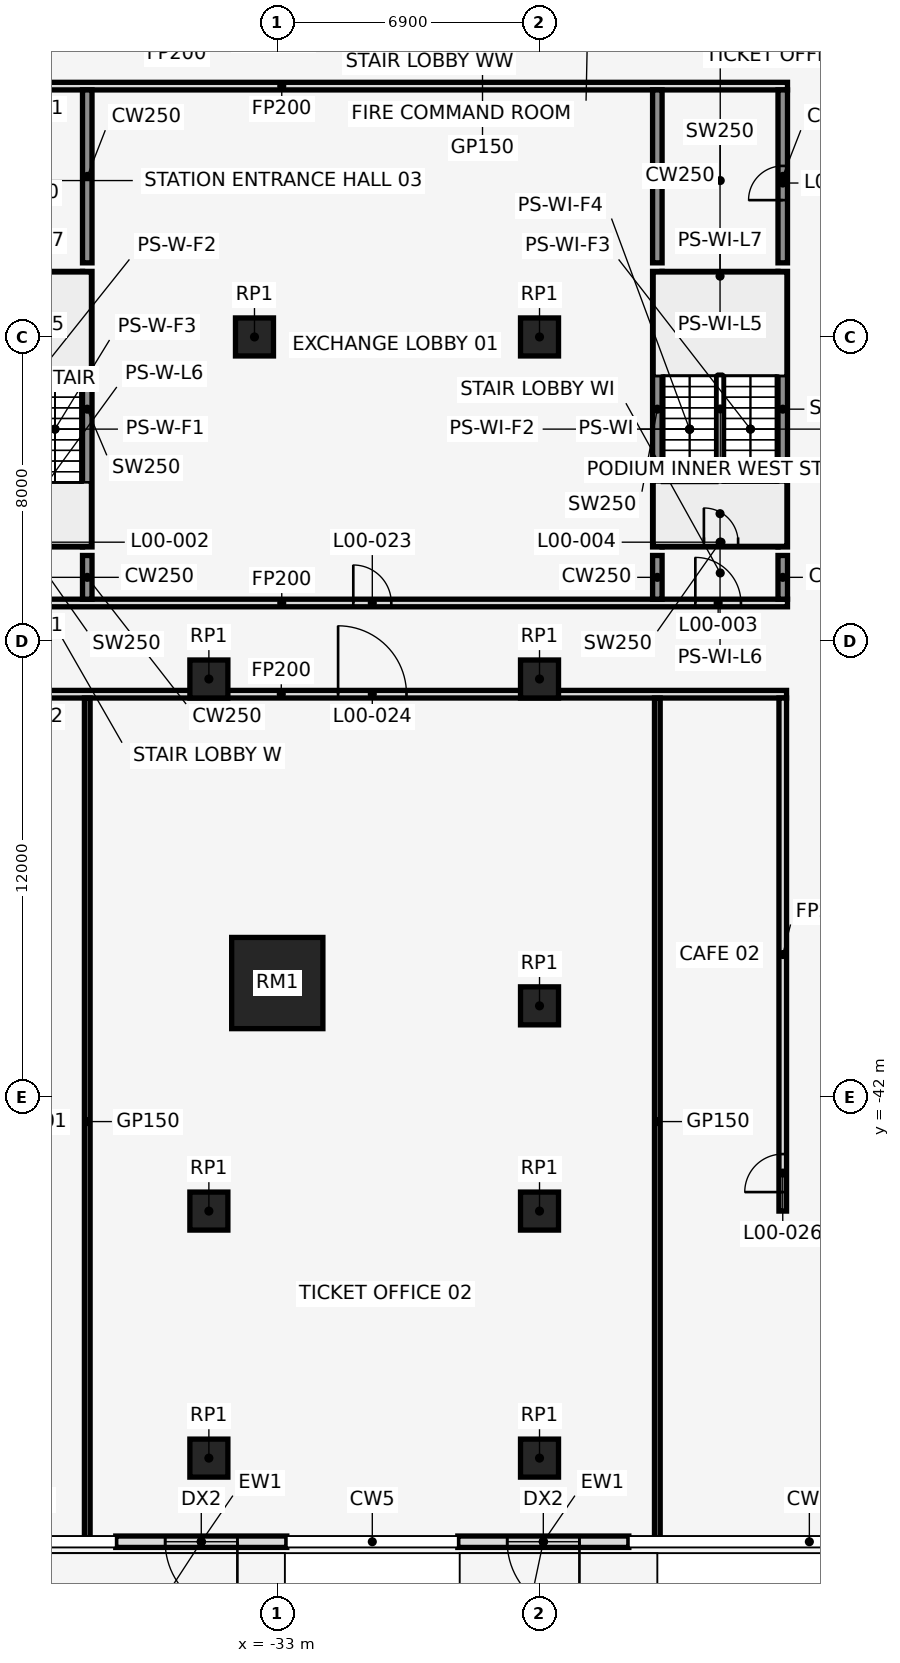
"""IFC4 building model, lengths in metres.
Left out: names, types, materials, properties, quantities, classifications, styles, units other than length and angle.
Written with IfcOpenShell. Run it as: python <this file> out.ifc"""

import sys

from ifc_helpers import new_model, si_unit, direction, frame, frame_2d, origin, origin_2d, place, context, subcontext, project, spatial, rectangle, extrude, element, fill, save


model = new_model("IFC4")
c1 = context("Model", 3, precision=1e-05, world=origin(), true_north=direction((0.0, 1.0)))
c2 = subcontext(c1, "Body", "Model", "MODEL_VIEW")
j1 = project(units=[si_unit("LENGTHUNIT", "METRE"), si_unit("PLANEANGLEUNIT", "RADIAN")], contexts=[c1])
p1 = place(None, origin())
s1 = spatial("IfcSite", under=j1, at=p1, CompositionType="ELEMENT")
p2 = place(p1, origin())
s2 = spatial("IfcBuilding", under=s1, at=p2, CompositionType="ELEMENT")
p3 = place(p2, origin())
s3 = spatial("IfcBuildingStorey", under=s2, at=p3, CompositionType="ELEMENT", Elevation=0.0)
p4 = place(p3, frame((-33.0, -39.0, 0.0), z_axis=(0.0, 0.0, 1.0), x_axis=(1.0, 0.0, 0.0)))
e1 = element("IfcColumn", 1, at=p4, inside=s3, PredefinedType="COLUMN", context=c2, shape_type="SweptSolid", body=[
    extrude(rectangle(XDim=2.4, YDim=2.4, at=origin_2d()), origin(), (0.0, 0.0, 1.0), 8.0),
])
for number, where, z_axis, x_axis in (
    (2, (-26.1, -39.6, 0.0), (0.0, 0.0, 1.0), (1.0, 0.0, 0.0)),
    (3, (-33.6, -22.0, 0.0), (0.0, 0.0, 1.0), (1.0, 0.0, 0.0)),
    (4, (-26.1, -22.0, 0.0), (0.0, 0.0, 1.0), (1.0, 0.0, 0.0)),
    (5, (-34.8, -31.0, 0.0), (0.0, 0.0, 1.0), (1.0, 0.0, 0.0)),
    (6, (-34.8, -45.0, 0.0), (0.0, 0.0, 1.0), (1.0, 0.0, 0.0)),
    (7, (-34.8, -51.5, 0.0), (0.0, 0.0, 1.0), (1.0, 0.0, 0.0)),
    (8, (-26.1, -31.0, 0.0), (0.0, 0.0, 1.0), (1.0, 0.0, 0.0)),
    (9, (-26.1, -45.0, 0.0), (0.0, 0.0, 1.0), (1.0, 0.0, 0.0)),
    (10, (-26.1, -51.5, 0.0), (0.0, 0.0, 1.0), (1.0, 0.0, 0.0)),
):
    element("IfcColumn", number, at=place(p3, frame(where, z_axis=z_axis, x_axis=x_axis)), inside=s3, PredefinedType="COLUMN", context=c2, shape_type="SweptSolid", body=[
        extrude(rectangle(XDim=1.0, YDim=1.0, at=origin_2d()), origin(), (0.0, 0.0, 1.0), 8.0),
    ])
p5 = place(p3, frame((-32.75, -53.7, 0.0), z_axis=(0.0, 0.0, 1.0), x_axis=(-1.0, 0.0, 0.0)))
e11 = element("IfcWall", 11, at=p5, inside=s3, PredefinedType="STANDARD", context=c2, shape_type="SweptSolid", body=[
    extrude(rectangle(XDim=4.5, YDim=0.3, at=frame_2d((2.25, 0.0))), origin(), (0.0, 0.0, 1.0), 7.7),
])
p6 = place(p5, frame((1.3, 0.0, 0.0)))
e12 = element("IfcOpeningElement", 12, at=p6, cuts=e11, PredefinedType="OPENING", context=c2, shape_type="SweptSolid", body=[
    extrude(rectangle(XDim=1.9, YDim=2.6, at=frame_2d((0.95, 1.3))), frame((0.0, 0.162, 0.0), z_axis=(0.0, -1.0, 0.0), x_axis=(1.0, 0.0, 0.0)), (0.0, 0.0, 1.0), 0.324),
])
p7 = place(p5, frame((1.3, 0.0, 3.3)))
e13 = element("IfcOpeningElement", 13, at=p7, cuts=e11, PredefinedType="OPENING", context=c2, shape_type="SweptSolid", body=[
    extrude(rectangle(XDim=1.9, YDim=3.0, at=frame_2d((0.95, 1.5))), frame((0.0, 0.162, 0.0), z_axis=(0.0, -1.0, 0.0), x_axis=(1.0, 0.0, 0.0)), (0.0, 0.0, 1.0), 0.324),
])
p8 = place(p3, frame((-23.75, -53.7, 0.0), z_axis=(0.0, 0.0, 1.0), x_axis=(-1.0, 0.0, 0.0)))
e14 = element("IfcWall", 14, at=p8, inside=s3, PredefinedType="STANDARD", context=c2, shape_type="SweptSolid", body=[
    extrude(rectangle(XDim=4.5, YDim=0.3, at=frame_2d((2.25, 0.0))), origin(), (0.0, 0.0, 1.0), 7.7),
])
p9 = place(p8, frame((1.3, 0.0, 0.0)))
e15 = element("IfcOpeningElement", 15, at=p9, cuts=e14, PredefinedType="OPENING", context=c2, shape_type="SweptSolid", body=[
    extrude(rectangle(XDim=1.9, YDim=2.6, at=frame_2d((0.95, 1.3))), frame((0.0, 0.162, 0.0), z_axis=(0.0, -1.0, 0.0), x_axis=(1.0, 0.0, 0.0)), (0.0, 0.0, 1.0), 0.324),
])
p10 = place(p8, frame((1.3, 0.0, 3.3)))
e16 = element("IfcOpeningElement", 16, at=p10, cuts=e14, PredefinedType="OPENING", context=c2, shape_type="SweptSolid", body=[
    extrude(rectangle(XDim=1.9, YDim=3.0, at=frame_2d((0.95, 1.5))), frame((0.0, 0.162, 0.0), z_axis=(0.0, -1.0, 0.0), x_axis=(1.0, 0.0, 0.0)), (0.0, 0.0, 1.0), 0.324),
])
p11 = place(p3, frame((-38.0, -27.525, 0.0), z_axis=(0.0, 0.0, 1.0), x_axis=(0.0, 1.0, 0.0)))
e17 = element("IfcWall", 17, at=p11, inside=s3, PredefinedType="SHEAR", context=c2, shape_type="SweptSolid", body=[
    extrude(rectangle(XDim=7.25, YDim=0.25, at=frame_2d((3.625, 0.0))), origin(), (0.0, 0.0, 1.0), 8.0),
])
p12 = place(p3, frame((-41.175, -27.4, 0.0), z_axis=(0.0, 0.0, 1.0), x_axis=(1.0, 0.0, 0.0)))
e18 = element("IfcWall", 18, at=p12, inside=s3, PredefinedType="SHEAR", context=c2, shape_type="SweptSolid", body=[
    extrude(rectangle(XDim=3.05, YDim=0.25, at=frame_2d((1.525, 0.0))), origin(), (0.0, 0.0, 1.0), 8.0),
])
p13 = place(p12, frame((1.1, 0.0, 0.0)))
e19 = element("IfcOpeningElement", 19, at=p13, cuts=e18, PredefinedType="OPENING", context=c2, shape_type="SweptSolid", body=[
    extrude(rectangle(XDim=0.9, YDim=2.1, at=frame_2d((0.45, 1.05))), frame((0.0, 0.137, 0.0), z_axis=(0.0, -1.0, 0.0), x_axis=(1.0, 0.0, 0.0)), (0.0, 0.0, 1.0), 0.274),
])
p14 = place(p3, frame((-41.175, -20.4, 0.0), z_axis=(0.0, 0.0, 1.0), x_axis=(1.0, 0.0, 0.0)))
e20 = element("IfcWall", 20, at=p14, inside=s3, PredefinedType="SHEAR", context=c2, shape_type="SweptSolid", body=[
    extrude(rectangle(XDim=3.05, YDim=0.25, at=frame_2d((1.525, 0.0))), origin(), (0.0, 0.0, 1.0), 8.0),
])
for number, where, z_axis, x_axis in (
    (21, (-23.0, -27.525, 0.0), (0.0, 0.0, 1.0), (0.0, 1.0, 0.0)),
    (22, (-19.7, -27.525, 0.0), (0.0, 0.0, 1.0), (0.0, 1.0, 0.0)),
):
    element("IfcWall", number, at=place(p3, frame(where, z_axis=z_axis, x_axis=x_axis)), inside=s3, PredefinedType="SHEAR", context=c2, shape_type="SweptSolid", body=[
        extrude(rectangle(XDim=7.25, YDim=0.25, at=frame_2d((3.625, 0.0))), origin(), (0.0, 0.0, 1.0), 8.0),
    ])
p15 = place(p3, frame((-22.875, -27.4, 0.0), z_axis=(0.0, 0.0, 1.0), x_axis=(1.0, 0.0, 0.0)))
e23 = element("IfcWall", 23, at=p15, inside=s3, PredefinedType="SHEAR", context=c2, shape_type="SweptSolid", body=[
    extrude(rectangle(XDim=3.05, YDim=0.25, at=frame_2d((1.525, 0.0))), origin(), (0.0, 0.0, 1.0), 8.0),
])
p16 = place(p15, frame((1.1, 0.0, 0.0)))
e24 = element("IfcOpeningElement", 24, at=p16, cuts=e23, PredefinedType="OPENING", context=c2, shape_type="SweptSolid", body=[
    extrude(rectangle(XDim=0.9, YDim=2.1, at=frame_2d((0.45, 1.05))), frame((0.0, 0.137, 0.0), z_axis=(0.0, -1.0, 0.0), x_axis=(1.0, 0.0, 0.0)), (0.0, 0.0, 1.0), 0.274),
])
p17 = place(p3, frame((-22.875, -20.4, 0.0), z_axis=(0.0, 0.0, 1.0), x_axis=(1.0, 0.0, 0.0)))
e25 = element("IfcWall", 25, at=p17, inside=s3, PredefinedType="SHEAR", context=c2, shape_type="SweptSolid", body=[
    extrude(rectangle(XDim=3.05, YDim=0.25, at=frame_2d((1.525, 0.0))), origin(), (0.0, 0.0, 1.0), 8.0),
])
p18 = place(p3, frame((-46.19, -31.4, 0.0), z_axis=(0.0, 0.0, 1.0), x_axis=(1.0, 0.0, 0.0)))
e26 = element("IfcWall", 26, at=p18, inside=s3, PredefinedType="PARTITIONING", context=c2, shape_type="SweptSolid", body=[
    extrude(rectangle(XDim=26.59, YDim=0.2, at=frame_2d((13.295, 0.0))), origin(), (0.0, 0.0, 1.0), 7.7),
])
p19 = place(p18, frame((0.4, 0.0, 0.0)))
e27 = element("IfcOpeningElement", 27, at=p19, cuts=e26, PredefinedType="OPENING", context=c2, shape_type="SweptSolid", body=[
    extrude(rectangle(XDim=1.0, YDim=2.1, at=frame_2d((0.5, 1.05))), frame((0.0, 0.112, 0.0), z_axis=(0.0, -1.0, 0.0), x_axis=(1.0, 0.0, 0.0)), (0.0, 0.0, 1.0), 0.224),
])
p20 = place(p18, frame((5.99, 0.0, 0.0)))
e28 = element("IfcOpeningElement", 28, at=p20, cuts=e26, PredefinedType="OPENING", context=c2, shape_type="SweptSolid", body=[
    extrude(rectangle(XDim=1.0, YDim=2.1, at=frame_2d((0.5, 1.05))), frame((0.0, 0.112, 0.0), z_axis=(0.0, -1.0, 0.0), x_axis=(1.0, 0.0, 0.0)), (0.0, 0.0, 1.0), 0.224),
])
p21 = place(p18, frame((14.79, 0.0, 0.0)))
e29 = element("IfcOpeningElement", 29, at=p21, cuts=e26, PredefinedType="OPENING", context=c2, shape_type="SweptSolid", body=[
    extrude(rectangle(XDim=1.8, YDim=2.1, at=frame_2d((0.9, 1.05))), frame((0.0, 0.112, 0.0), z_axis=(0.0, -1.0, 0.0), x_axis=(1.0, 0.0, 0.0)), (0.0, 0.0, 1.0), 0.224),
])
p22 = place(p3, frame((-46.19, -29.0, 0.0), z_axis=(0.0, 0.0, 1.0), x_axis=(1.0, 0.0, 0.0)))
e30 = element("IfcWall", 30, at=p22, inside=s3, PredefinedType="PARTITIONING", context=c2, shape_type="SweptSolid", body=[
    extrude(rectangle(XDim=26.615, YDim=0.2, at=frame_2d((13.308, 0.0))), origin(), (0.0, 0.0, 1.0), 7.7),
])
p23 = place(p22, frame((5.89, 0.0, 0.0)))
e31 = element("IfcOpeningElement", 31, at=p23, cuts=e30, PredefinedType="OPENING", context=c2, shape_type="SweptSolid", body=[
    extrude(rectangle(XDim=1.2, YDim=2.1, at=frame_2d((0.6, 1.05))), frame((0.0, 0.112, 0.0), z_axis=(0.0, -1.0, 0.0), x_axis=(1.0, 0.0, 0.0)), (0.0, 0.0, 1.0), 0.224),
])
p24 = place(p22, frame((24.19, 0.0, 0.0)))
e32 = element("IfcOpeningElement", 32, at=p24, cuts=e30, PredefinedType="OPENING", context=c2, shape_type="SweptSolid", body=[
    extrude(rectangle(XDim=1.2, YDim=2.1, at=frame_2d((0.6, 1.05))), frame((0.0, 0.112, 0.0), z_axis=(0.0, -1.0, 0.0), x_axis=(1.0, 0.0, 0.0)), (0.0, 0.0, 1.0), 0.224),
])
p25 = place(p22, frame((1.9, 0.0, 0.0)))
e33 = element("IfcOpeningElement", 33, at=p25, cuts=e30, PredefinedType="OPENING", context=c2, shape_type="SweptSolid", body=[
    extrude(rectangle(XDim=1.0, YDim=2.1, at=frame_2d((0.5, 1.05))), frame((0.0, 0.112, 0.0), z_axis=(0.0, -1.0, 0.0), x_axis=(1.0, 0.0, 0.0)), (0.0, 0.0, 1.0), 0.224),
])
p26 = place(p22, frame((15.19, 0.0, 0.0)))
e34 = element("IfcOpeningElement", 34, at=p26, cuts=e30, PredefinedType="OPENING", context=c2, shape_type="SweptSolid", body=[
    extrude(rectangle(XDim=1.0, YDim=2.1, at=frame_2d((0.5, 1.05))), frame((0.0, 0.112, 0.0), z_axis=(0.0, -1.0, 0.0), x_axis=(1.0, 0.0, 0.0)), (0.0, 0.0, 1.0), 0.224),
])
p27 = place(p3, frame((-46.19, -15.4, 0.0), z_axis=(0.0, 0.0, 1.0), x_axis=(1.0, 0.0, 0.0)))
e35 = element("IfcWall", 35, at=p27, inside=s3, PredefinedType="PARTITIONING", context=c2, shape_type="SweptSolid", body=[
    extrude(rectangle(XDim=26.615, YDim=0.2, at=frame_2d((13.308, 0.0))), origin(), (0.0, 0.0, 1.0), 7.7),
])
p28 = place(p27, frame((6.09, 0.0, 0.0)))
e36 = element("IfcOpeningElement", 36, at=p28, cuts=e35, PredefinedType="OPENING", context=c2, shape_type="SweptSolid", body=[
    extrude(rectangle(XDim=0.9, YDim=2.1, at=frame_2d((0.45, 1.05))), frame((0.0, 0.112, 0.0), z_axis=(0.0, -1.0, 0.0), x_axis=(1.0, 0.0, 0.0)), (0.0, 0.0, 1.0), 0.224),
])
p29 = place(p3, frame((-38.0, -53.79, 0.0), z_axis=(0.0, 0.0, 1.0), x_axis=(0.0, 1.0, 0.0)))
e37 = element("IfcWall", 37, at=p29, inside=s3, PredefinedType="PARTITIONING", context=c2, shape_type="SweptSolid", body=[
    extrude(rectangle(XDim=22.29, YDim=0.15, at=frame_2d((11.145, 0.0))), origin(), (0.0, 0.0, 1.0), 7.7),
])
p30 = place(p3, frame((-38.0, -28.9, 0.0), z_axis=(0.0, 0.0, 1.0), x_axis=(0.0, 1.0, 0.0)))
e38 = element("IfcWall", 38, at=p30, inside=s3, PredefinedType="SHEAR", context=c2, shape_type="SweptSolid", body=[
    extrude(rectangle(XDim=1.15, YDim=0.25, at=frame_2d((0.575, 0.0))), origin(), (0.0, 0.0, 1.0), 8.0),
])
p31 = place(p3, frame((-38.0, -20.05, 0.0), z_axis=(0.0, 0.0, 1.0), x_axis=(0.0, 1.0, 0.0)))
e39 = element("IfcWall", 39, at=p31, inside=s3, PredefinedType="SHEAR", context=c2, shape_type="SweptSolid", body=[
    extrude(rectangle(XDim=4.55, YDim=0.25, at=frame_2d((2.275, 0.0))), origin(), (0.0, 0.0, 1.0), 8.0),
])
p32 = place(p3, frame((-23.0, -53.79, 0.0), z_axis=(0.0, 0.0, 1.0), x_axis=(0.0, 1.0, 0.0)))
e40 = element("IfcWall", 40, at=p32, inside=s3, PredefinedType="PARTITIONING", context=c2, shape_type="SweptSolid", body=[
    extrude(rectangle(XDim=22.29, YDim=0.15, at=frame_2d((11.145, 0.0))), origin(), (0.0, 0.0, 1.0), 7.7),
])
p33 = place(p3, frame((-23.0, -28.9, 0.0), z_axis=(0.0, 0.0, 1.0), x_axis=(0.0, 1.0, 0.0)))
e41 = element("IfcWall", 41, at=p33, inside=s3, PredefinedType="SHEAR", context=c2, shape_type="SweptSolid", body=[
    extrude(rectangle(XDim=1.15, YDim=0.25, at=frame_2d((0.575, 0.0))), origin(), (0.0, 0.0, 1.0), 8.0),
])
p34 = place(p3, frame((-23.0, -20.05, 0.0), z_axis=(0.0, 0.0, 1.0), x_axis=(0.0, 1.0, 0.0)))
e42 = element("IfcWall", 42, at=p34, inside=s3, PredefinedType="SHEAR", context=c2, shape_type="SweptSolid", body=[
    extrude(rectangle(XDim=4.55, YDim=0.25, at=frame_2d((2.275, 0.0))), origin(), (0.0, 0.0, 1.0), 8.0),
])
p35 = place(p3, frame((-19.7, -45.0, 0.0), z_axis=(0.0, 0.0, 1.0), x_axis=(0.0, 1.0, 0.0)))
e43 = element("IfcWall", 43, at=p35, inside=s3, PredefinedType="PARTITIONING", context=c2, shape_type="SweptSolid", body=[
    extrude(rectangle(XDim=13.5, YDim=0.2, at=frame_2d((6.75, 0.0))), origin(), (0.0, 0.0, 1.0), 7.7),
])
p36 = place(p35, frame((0.5, 0.0, 0.0)))
e44 = element("IfcOpeningElement", 44, at=p36, cuts=e43, PredefinedType="OPENING", context=c2, shape_type="SweptSolid", body=[
    extrude(rectangle(XDim=1.0, YDim=2.1, at=frame_2d((0.5, 1.05))), frame((0.0, 0.112, 0.0), z_axis=(0.0, -1.0, 0.0), x_axis=(1.0, 0.0, 0.0)), (0.0, 0.0, 1.0), 0.224),
])
p37 = place(p3, frame((-19.7, -28.9, 0.0), z_axis=(0.0, 0.0, 1.0), x_axis=(0.0, 1.0, 0.0)))
e45 = element("IfcWall", 45, at=p37, inside=s3, PredefinedType="SHEAR", context=c2, shape_type="SweptSolid", body=[
    extrude(rectangle(XDim=1.15, YDim=0.25, at=frame_2d((0.575, 0.0))), origin(), (0.0, 0.0, 1.0), 8.0),
])
p38 = place(p3, frame((-19.7, -20.05, 0.0), z_axis=(0.0, 0.0, 1.0), x_axis=(0.0, 1.0, 0.0)))
e46 = element("IfcWall", 46, at=p38, inside=s3, PredefinedType="SHEAR", context=c2, shape_type="SweptSolid", body=[
    extrude(rectangle(XDim=4.55, YDim=0.25, at=frame_2d((2.275, 0.0))), origin(), (0.0, 0.0, 1.0), 8.0),
])
p39 = place(p38, frame((1.65, 0.0, 0.0)))
e47 = element("IfcOpeningElement", 47, at=p39, cuts=e46, PredefinedType="OPENING", context=c2, shape_type="SweptSolid", body=[
    extrude(rectangle(XDim=0.9, YDim=2.1, at=frame_2d((0.45, 1.05))), frame((0.0, 0.137, 0.0), z_axis=(0.0, -1.0, 0.0), x_axis=(1.0, 0.0, 0.0)), (0.0, 0.0, 1.0), 0.274),
])
p40 = place(p6, origin())
e48 = element("IfcDoor", 48, at=p40, inside=s3, OperationType="SINGLE_SWING_LEFT", PredefinedType="DOOR", context=c2, shape_type="SweptSolid", body=[
    extrude(rectangle(XDim=1.9, YDim=2.6, at=frame_2d((0.95, 1.3))), frame((0.0, 0.025, 0.0), z_axis=(0.0, -1.0, 0.0), x_axis=(1.0, 0.0, 0.0)), (0.0, 0.0, 1.0), 0.05),
])
fill(e12, e48)
p41 = place(p7, origin())
e49 = element("IfcWindow", 49, at=p41, inside=s3, PartitioningType="SINGLE_PANEL", PredefinedType="WINDOW", context=c2, shape_type="SweptSolid", body=[
    extrude(rectangle(XDim=1.9, YDim=3.0, at=frame_2d((0.95, 1.5))), frame((0.0, 0.03, 0.0), z_axis=(0.0, -1.0, 0.0), x_axis=(1.0, 0.0, 0.0)), (0.0, 0.0, 1.0), 0.06),
])
fill(e13, e49)
p42 = place(p9, origin())
e50 = element("IfcDoor", 50, at=p42, inside=s3, OperationType="SINGLE_SWING_LEFT", PredefinedType="DOOR", context=c2, shape_type="SweptSolid", body=[
    extrude(rectangle(XDim=1.9, YDim=2.6, at=frame_2d((0.95, 1.3))), frame((0.0, 0.025, 0.0), z_axis=(0.0, -1.0, 0.0), x_axis=(1.0, 0.0, 0.0)), (0.0, 0.0, 1.0), 0.05),
])
fill(e15, e50)
p43 = place(p10, origin())
e51 = element("IfcWindow", 51, at=p43, inside=s3, PartitioningType="SINGLE_PANEL", PredefinedType="WINDOW", context=c2, shape_type="SweptSolid", body=[
    extrude(rectangle(XDim=1.9, YDim=3.0, at=frame_2d((0.95, 1.5))), frame((0.0, 0.03, 0.0), z_axis=(0.0, -1.0, 0.0), x_axis=(1.0, 0.0, 0.0)), (0.0, 0.0, 1.0), 0.06),
])
fill(e16, e51)
p44 = place(p24, origin())
e52 = element("IfcDoor", 52, at=p44, inside=s3, OperationType="SINGLE_SWING_RIGHT", PredefinedType="DOOR", context=c2, shape_type="SweptSolid", body=[
    extrude(rectangle(XDim=1.2, YDim=2.1, at=frame_2d((0.6, 1.05))), frame((0.0, 0.025, 0.0), z_axis=(0.0, -1.0, 0.0), x_axis=(1.0, 0.0, 0.0)), (0.0, 0.0, 1.0), 0.05),
])
fill(e32, e52)
p45 = place(p16, origin())
e53 = element("IfcDoor", 53, at=p45, inside=s3, OperationType="SINGLE_SWING_LEFT", PredefinedType="DOOR", context=c2, shape_type="SweptSolid", body=[
    extrude(rectangle(XDim=0.9, YDim=2.1, at=frame_2d((0.45, 1.05))), frame((0.0, 0.025, 0.0), z_axis=(0.0, -1.0, 0.0), x_axis=(1.0, 0.0, 0.0)), (0.0, 0.0, 1.0), 0.05),
])
fill(e24, e53)
p46 = place(p26, origin())
e54 = element("IfcDoor", 54, at=p46, inside=s3, OperationType="SINGLE_SWING_LEFT", PredefinedType="DOOR", context=c2, shape_type="SweptSolid", body=[
    extrude(rectangle(XDim=1.0, YDim=2.1, at=frame_2d((0.5, 1.05))), frame((0.0, 0.025, 0.0), z_axis=(0.0, -1.0, 0.0), x_axis=(1.0, 0.0, 0.0)), (0.0, 0.0, 1.0), 0.05),
])
fill(e34, e54)
p47 = place(p21, origin())
e55 = element("IfcDoor", 55, at=p47, inside=s3, OperationType="SINGLE_SWING_LEFT", PredefinedType="DOOR", context=c2, shape_type="SweptSolid", body=[
    extrude(rectangle(XDim=1.8, YDim=2.1, at=frame_2d((0.9, 1.05))), frame((0.0, 0.025, 0.0), z_axis=(0.0, -1.0, 0.0), x_axis=(1.0, 0.0, 0.0)), (0.0, 0.0, 1.0), 0.05),
])
fill(e29, e55)
p48 = place(p39, origin())
e56 = element("IfcDoor", 56, at=p48, inside=s3, OperationType="SINGLE_SWING_LEFT", PredefinedType="DOOR", context=c2, shape_type="SweptSolid", body=[
    extrude(rectangle(XDim=0.9, YDim=2.1, at=frame_2d((0.45, 1.05))), frame((0.0, 0.025, 0.0), z_axis=(0.0, -1.0, 0.0), x_axis=(1.0, 0.0, 0.0)), (0.0, 0.0, 1.0), 0.05),
])
fill(e47, e56)
p49 = place(p36, origin())
e57 = element("IfcDoor", 57, at=p49, inside=s3, OperationType="SINGLE_SWING_LEFT", PredefinedType="DOOR", context=c2, shape_type="SweptSolid", body=[
    extrude(rectangle(XDim=1.0, YDim=2.1, at=frame_2d((0.5, 1.05))), frame((0.0, 0.025, 0.0), z_axis=(0.0, -1.0, 0.0), x_axis=(1.0, 0.0, 0.0)), (0.0, 0.0, 1.0), 0.05),
])
fill(e44, e57)
save(model, sys.argv[1])
